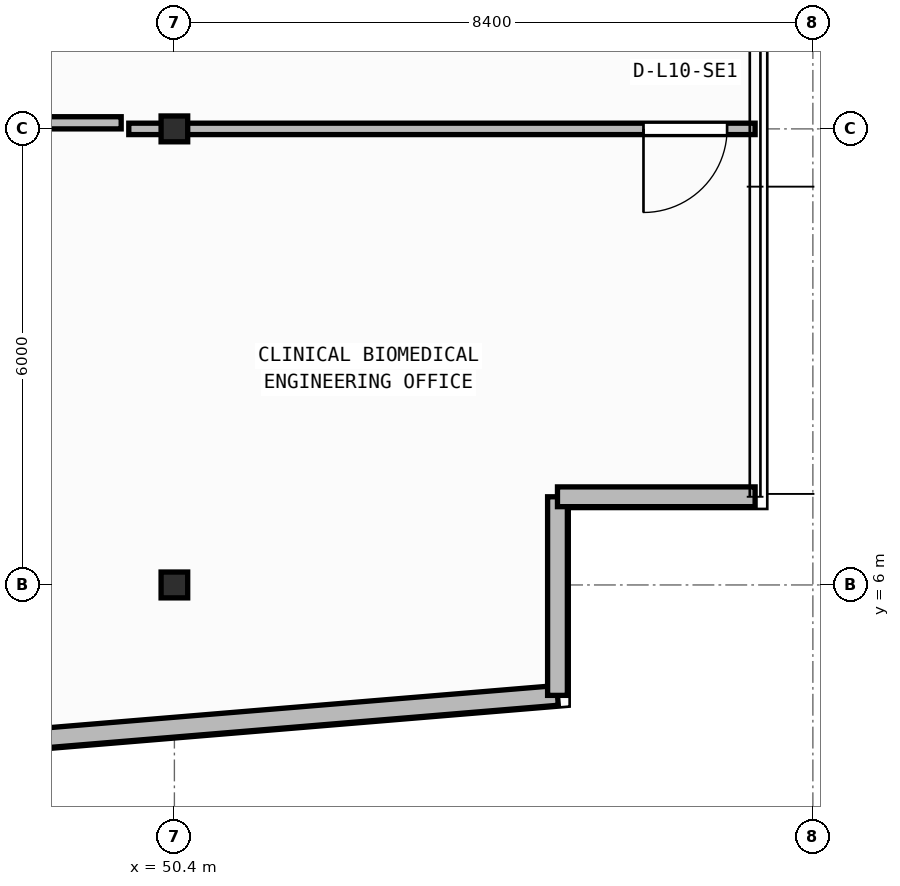
"""IFC4 building model, lengths in metres.
Left out: names, types, materials, properties, quantities, classifications, styles, units other than length and angle.
Written with IfcOpenShell. Run it as: python <this file> out.ifc"""

import sys

from ifc_helpers import new_model, si_unit, direction, frame, frame_2d, origin, origin_2d, place, context, subcontext, project, spatial, rectangle, i_section, extrude, element, fill, save


model = new_model("IFC4")
c1 = context("Model", 3, precision=1e-05, world=origin(), true_north=direction((0.0, 1.0)))
c2 = subcontext(c1, "Body", "Model", "MODEL_VIEW")
j1 = project(units=[si_unit("LENGTHUNIT", "METRE"), si_unit("PLANEANGLEUNIT", "RADIAN")], contexts=[c1])
p1 = place(None, origin())
s1 = spatial("IfcSite", under=j1, at=p1, CompositionType="ELEMENT")
p2 = place(p1, origin())
s2 = spatial("IfcBuilding", under=s1, at=p2, CompositionType="ELEMENT")
p3 = place(p2, frame((0.0, 0.0, 42.25)))
s3 = spatial("IfcBuildingStorey", under=s2, at=p3, CompositionType="ELEMENT", Elevation=42.25)
for number, where, z_axis, x_axis in (
    (1, (50.4, 6.0, 0.0), (0.0, 0.0, 1.0), (1.0, 0.0, 0.0)),
    (2, (50.4, 12.0, 0.0), (0.0, 0.0, 1.0), (1.0, 0.0, 0.0)),
):
    element("IfcColumn", number, at=place(p3, frame(where, z_axis=z_axis, x_axis=x_axis)), inside=s3, PredefinedType="COLUMN", context=c2, shape_type="SweptSolid", body=[
        extrude(i_section(OverallWidth=0.35, OverallDepth=0.34, WebThickness=0.016, FlangeThickness=0.028, at=origin_2d()), origin(), (0.0, 0.0, 1.0), 3.95),
    ])
p4 = place(p3, frame((2.76, 0.174, 0.0), z_axis=(0.0, 0.0, 1.0), x_axis=(0.996571478456, 0.082736257641, 0.0)))
e3 = element("IfcWall", 3, at=p4, inside=s3, PredefinedType="STANDARD", context=c2, shape_type="SweptSolid", body=[
    extrude(rectangle(XDim=52.861, YDim=0.26, at=frame_2d((26.431, 0.0))), origin(), (0.0, 0.0, 1.0), 3.71),
])
p5 = place(p4, frame((25.231, 0.0, 0.9)))
e4 = element("IfcOpeningElement", 4, at=p5, cuts=e3, PredefinedType="OPENING", context=c2, shape_type="SweptSolid", body=[
    extrude(rectangle(XDim=2.4, YDim=1.65, at=frame_2d((1.2, 0.825))), frame((0.0, 0.14, 0.0), z_axis=(0.0, -1.0, 0.0), x_axis=(1.0, 0.0, 0.0)), (0.0, 0.0, 1.0), 0.28),
])
p6 = place(p3, frame((55.44, 4.547, 0.0), z_axis=(0.0, 0.0, 1.0), x_axis=(0.0, 1.0, 0.0)))
e5 = element("IfcWall", 5, at=p6, inside=s3, PredefinedType="STANDARD", context=c2, shape_type="SweptSolid", body=[
    extrude(rectangle(XDim=2.613, YDim=0.26, at=frame_2d((1.306, 0.0))), origin(), (0.0, 0.0, 1.0), 3.71),
])
p7 = place(p3, frame((55.44, 7.16, 0.0), z_axis=(0.0, 0.0, 1.0), x_axis=(1.0, 0.0, 0.0)))
e6 = element("IfcWall", 6, at=p7, inside=s3, PredefinedType="STANDARD", context=c2, shape_type="SweptSolid", body=[
    extrude(rectangle(XDim=2.6, YDim=0.26, at=frame_2d((1.3, 0.0))), origin(), (0.0, 0.0, 1.0), 3.71),
])
p8 = place(p3, frame((58.04, 12.0, 0.0), z_axis=(0.0, 0.0, 1.0), x_axis=(-1.0, 0.0, 0.0)))
e7 = element("IfcWall", 7, at=p8, inside=s3, PredefinedType="PARTITIONING", context=c2, shape_type="SweptSolid", body=[
    extrude(rectangle(XDim=8.24, YDim=0.15, at=frame_2d((4.12, 0.0))), origin(), (0.0, 0.0, 1.0), 3.073),
])
p9 = place(p8, frame((0.368, 0.0, 0.0)))
e8 = element("IfcOpeningElement", 8, at=p9, cuts=e7, PredefinedType="OPENING", context=c2, shape_type="SweptSolid", body=[
    extrude(rectangle(XDim=1.1, YDim=2.1, at=frame_2d((0.55, 1.05))), frame((0.0, 0.085, 0.0), z_axis=(0.0, -1.0, 0.0), x_axis=(1.0, 0.0, 0.0)), (0.0, 0.0, 1.0), 0.17),
])
p10 = place(p3, frame((46.689, 12.08, 0.0), z_axis=(0.0, 0.0, 1.0), x_axis=(1.0, 0.0, 0.0)))
e9 = element("IfcWall", 9, at=p10, inside=s3, PredefinedType="PARTITIONING", context=c2, shape_type="SweptSolid", body=[
    extrude(rectangle(XDim=3.011, YDim=0.16, at=frame_2d((1.505, 0.0))), origin(), (0.0, 0.0, 1.0), 3.073),
])
p11 = place(p9, origin())
e10 = element("IfcDoor", 10, at=p11, inside=s3, OperationType="SINGLE_SWING_RIGHT", PredefinedType="DOOR", context=c2, shape_type="SweptSolid", body=[
    extrude(rectangle(XDim=1.1, YDim=2.1, at=frame_2d((0.55, 1.05))), frame((0.0, 0.025, 0.0), z_axis=(0.0, -1.0, 0.0), x_axis=(1.0, 0.0, 0.0)), (0.0, 0.0, 1.0), 0.05),
])
fill(e8, e10)
save(model, sys.argv[1])
